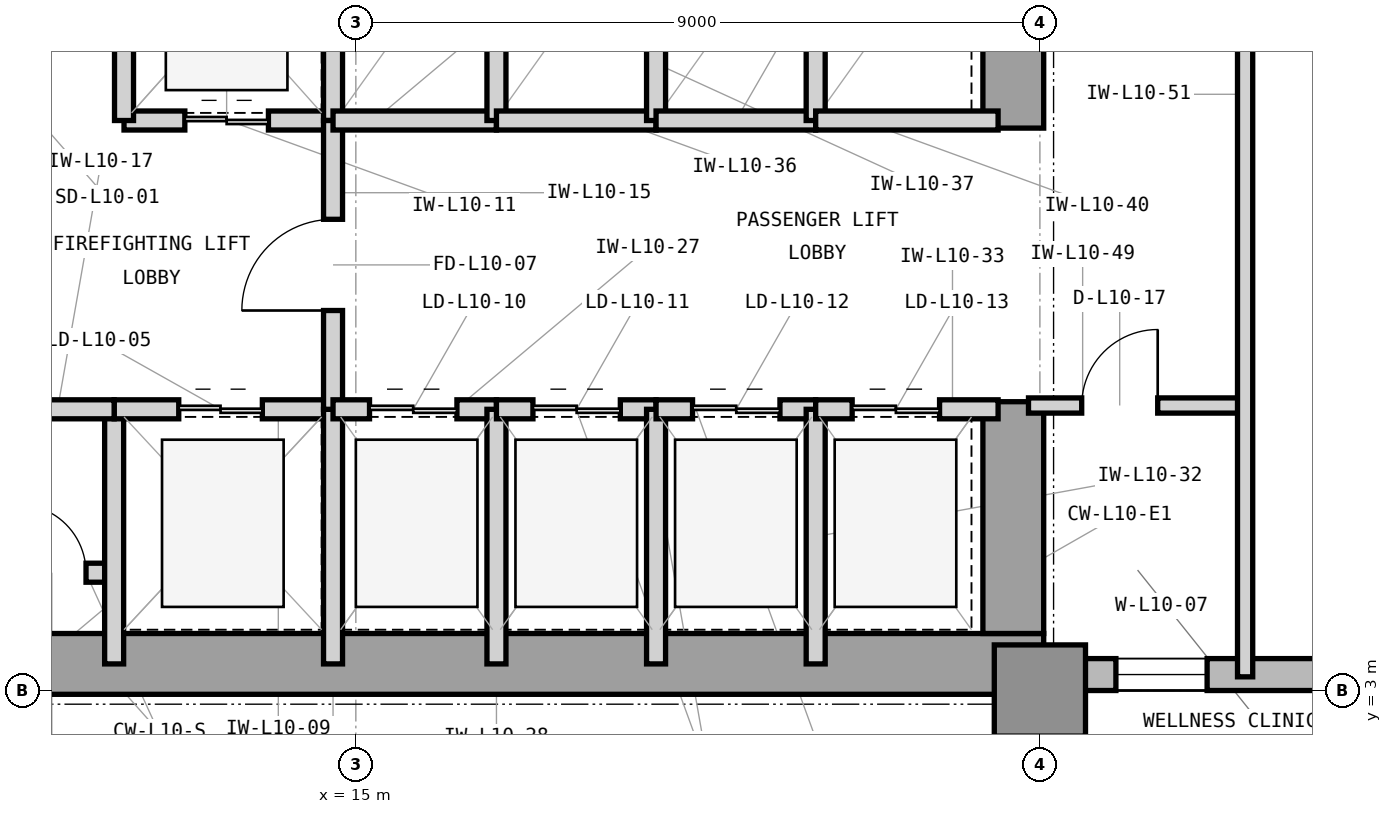
"""IFC4 building model, lengths in metres.
Left out: names, types, materials, properties, quantities, classifications, styles, units other than length and angle.
Written with IfcOpenShell. Run it as: python <this file> out.ifc"""

import sys

from ifc_helpers import new_model, si_unit, direction, frame, frame_2d, origin, origin_2d, place, context, subcontext, project, spatial, rectangle, extrude, element, fill, save


model = new_model("IFC4")
c1 = context("Model", 3, precision=1e-05, world=origin(), true_north=direction((0.0, 1.0)))
c2 = subcontext(c1, "Body", "Model", "MODEL_VIEW")
j1 = project(units=[si_unit("LENGTHUNIT", "METRE"), si_unit("PLANEANGLEUNIT", "RADIAN")], contexts=[c1])
p1 = place(None, origin())
s1 = spatial("IfcSite", under=j1, at=p1, CompositionType="ELEMENT")
p2 = place(p1, origin())
s2 = spatial("IfcBuilding", under=s1, at=p2, CompositionType="ELEMENT")
p3 = place(p2, frame((0.0, 0.0, 46.8)))
s3 = spatial("IfcBuildingStorey", under=s2, at=p3, CompositionType="ELEMENT", Elevation=46.8)
p4 = place(p3, frame((7.475, 3.35, 0.0), z_axis=(0.0, 0.0, 1.0), x_axis=(1.0, 0.0, 0.0)))
e1 = element("IfcWall", 1, at=p4, inside=s3, PredefinedType="SHEAR", context=c2, shape_type="SweptSolid", body=[
    extrude(rectangle(XDim=16.575, YDim=0.8, at=frame_2d((8.288, 0.0))), origin(), (0.0, 0.0, 1.0), 4.2),
])
p5 = place(p3, frame((23.65, 3.75, 0.0), z_axis=(0.0, 0.0, 1.0), x_axis=(0.0, 1.0, 0.0)))
e2 = element("IfcWall", 2, at=p5, inside=s3, PredefinedType="SHEAR", context=c2, shape_type="SweptSolid", body=[
    extrude(rectangle(XDim=3.05, YDim=0.8, at=frame_2d((1.525, 0.0))), origin(), (0.0, 0.0, 1.0), 4.2),
])
p6 = place(p3, frame((23.65, 10.4, 0.0), z_axis=(0.0, 0.0, 1.0), x_axis=(0.0, 1.0, 0.0)))
e3 = element("IfcWall", 3, at=p6, inside=s3, PredefinedType="SHEAR", context=c2, shape_type="SweptSolid", body=[
    extrude(rectangle(XDim=3.2, YDim=0.8, at=frame_2d((1.6, 0.0))), origin(), (0.0, 0.0, 1.0), 4.2),
])
p7 = place(p3, frame((24.0, 3.0, 0.0), z_axis=(0.0, 0.0, 1.0), x_axis=(1.0, 0.0, 0.0)))
e4 = element("IfcColumn", 4, at=p7, inside=s3, PredefinedType="COLUMN", context=c2, shape_type="SweptSolid", body=[
    extrude(rectangle(XDim=1.2, YDim=1.2, at=origin_2d()), origin(), (0.0, 0.0, 1.0), 4.2),
])
p8 = place(p3, frame((23.9, 3.21, 0.0), z_axis=(0.0, 0.0, 1.0), x_axis=(1.0, 0.0, 0.0)))
e5 = element("IfcWall", 5, at=p8, inside=s3, PredefinedType="STANDARD", context=c2, shape_type="SweptSolid", body=[
    extrude(rectangle(XDim=40.5, YDim=0.42, at=frame_2d((20.25, 0.0))), origin(), (0.0, 0.0, 1.0), 3.98),
])
p9 = place(p8, frame((1.1, 0.0, 0.85)))
e6 = element("IfcOpeningElement", 6, at=p9, cuts=e5, PredefinedType="OPENING", context=c2, shape_type="SweptSolid", body=[
    extrude(rectangle(XDim=1.2, YDim=2.45, at=frame_2d((0.6, 1.225))), frame((0.0, 0.22, 0.0), z_axis=(0.0, -1.0, 0.0), x_axis=(1.0, 0.0, 0.0)), (0.0, 0.0, 1.0), 0.44),
])
p10 = place(p8, frame((5.336, 0.0, 0.85)))
e7 = element("IfcOpeningElement", 7, at=p10, cuts=e5, PredefinedType="OPENING", context=c2, shape_type="SweptSolid", body=[
    extrude(rectangle(XDim=2.8, YDim=2.45, at=frame_2d((1.4, 1.225))), frame((0.0, 0.22, 0.0), z_axis=(0.0, -1.0, 0.0), x_axis=(1.0, 0.0, 0.0)), (0.0, 0.0, 1.0), 0.44),
])
p11 = place(p8, frame((14.336, 0.0, 0.85)))
e8 = element("IfcOpeningElement", 8, at=p11, cuts=e5, PredefinedType="OPENING", context=c2, shape_type="SweptSolid", body=[
    extrude(rectangle(XDim=2.8, YDim=2.45, at=frame_2d((1.4, 1.225))), frame((0.0, 0.22, 0.0), z_axis=(0.0, -1.0, 0.0), x_axis=(1.0, 0.0, 0.0)), (0.0, 0.0, 1.0), 0.44),
])
p12 = place(p8, frame((25.136, 0.0, 0.85)))
e9 = element("IfcOpeningElement", 9, at=p12, cuts=e5, PredefinedType="OPENING", context=c2, shape_type="SweptSolid", body=[
    extrude(rectangle(XDim=1.2, YDim=2.45, at=frame_2d((0.6, 1.225))), frame((0.0, 0.22, 0.0), z_axis=(0.0, -1.0, 0.0), x_axis=(1.0, 0.0, 0.0)), (0.0, 0.0, 1.0), 0.44),
])
p13 = place(p8, frame((34.086, 0.0, 0.85)))
e10 = element("IfcOpeningElement", 10, at=p13, cuts=e5, PredefinedType="OPENING", context=c2, shape_type="SweptSolid", body=[
    extrude(rectangle(XDim=1.2, YDim=2.45, at=frame_2d((0.6, 1.225))), frame((0.0, 0.22, 0.0), z_axis=(0.0, -1.0, 0.0), x_axis=(1.0, 0.0, 0.0)), (0.0, 0.0, 1.0), 0.44),
])
p14 = place(p3, frame((10.33, 4.55, 0.0), z_axis=(0.0, 0.0, 1.0), x_axis=(1.0, 0.0, 0.0)))
e11 = element("IfcWall", 11, at=p14, inside=s3, PredefinedType="PARTITIONING", context=c2, shape_type="SweptSolid", body=[
    extrude(rectangle(XDim=1.49, YDim=0.25, at=frame_2d((0.745, 0.0))), origin(), (0.0, 0.0, 1.0), 3.97),
])
p15 = place(p14, frame((0.22, 0.0, 0.0)))
e12 = element("IfcOpeningElement", 12, at=p15, cuts=e11, PredefinedType="OPENING", context=c2, shape_type="SweptSolid", body=[
    extrude(rectangle(XDim=0.9, YDim=2.1, at=frame_2d((0.45, 1.05))), frame((0.0, 0.135, 0.0), z_axis=(0.0, -1.0, 0.0), x_axis=(1.0, 0.0, 0.0)), (0.0, 0.0, 1.0), 0.27),
])
p16 = place(p3, frame((11.82, 3.35, 0.0), z_axis=(0.0, 0.0, 1.0), x_axis=(0.0, 1.0, 0.0)))
e13 = element("IfcWall", 13, at=p16, inside=s3, PredefinedType="PARTITIONING", context=c2, shape_type="SweptSolid", body=[
    extrude(rectangle(XDim=3.35, YDim=0.25, at=frame_2d((1.675, 0.0))), origin(), (0.0, 0.0, 1.0), 3.97),
])
p17 = place(p3, frame((11.82, 6.7, 0.0), z_axis=(0.0, 0.0, 1.0), x_axis=(1.0, 0.0, 0.0)))
e14 = element("IfcWall", 14, at=p17, inside=s3, PredefinedType="PARTITIONING", context=c2, shape_type="SweptSolid", body=[
    extrude(rectangle(XDim=2.88, YDim=0.25, at=frame_2d((1.44, 0.0))), origin(), (0.0, 0.0, 1.0), 3.426),
])
p18 = place(p17, frame((0.85, 0.0, 0.0)))
e15 = element("IfcOpeningElement", 15, at=p18, cuts=e14, PredefinedType="OPENING", context=c2, shape_type="SweptSolid", body=[
    extrude(rectangle(XDim=1.1, YDim=2.25, at=frame_2d((0.55, 1.125))), frame((0.0, 0.135, 0.0), z_axis=(0.0, -1.0, 0.0), x_axis=(1.0, 0.0, 0.0)), (0.0, 0.0, 1.0), 0.27),
])
p19 = place(p3, frame((14.7, 3.35, 0.0), z_axis=(0.0, 0.0, 1.0), x_axis=(0.0, 1.0, 0.0)))
e16 = element("IfcWall", 16, at=p19, inside=s3, PredefinedType="PARTITIONING", context=c2, shape_type="SweptSolid", body=[
    extrude(rectangle(XDim=3.35, YDim=0.25, at=frame_2d((1.675, 0.0))), origin(), (0.0, 0.0, 1.0), 3.97),
])
p20 = place(p3, frame((11.95, 10.5, 0.0), z_axis=(0.0, 0.0, 1.0), x_axis=(1.0, 0.0, 0.0)))
e17 = element("IfcWall", 17, at=p20, inside=s3, PredefinedType="PARTITIONING", context=c2, shape_type="SweptSolid", body=[
    extrude(rectangle(XDim=2.75, YDim=0.25, at=frame_2d((1.375, 0.0))), origin(), (0.0, 0.0, 1.0), 3.426),
])
p21 = place(p20, frame((0.8, 0.0, 0.0)))
e18 = element("IfcOpeningElement", 18, at=p21, cuts=e17, PredefinedType="OPENING", context=c2, shape_type="SweptSolid", body=[
    extrude(rectangle(XDim=1.1, YDim=2.25, at=frame_2d((0.55, 1.125))), frame((0.0, 0.135, 0.0), z_axis=(0.0, -1.0, 0.0), x_axis=(1.0, 0.0, 0.0)), (0.0, 0.0, 1.0), 0.27),
])
for number, where, z_axis, x_axis in (
    (19, (11.95, 10.5, 0.0), (0.0, 0.0, 1.0), (0.0, 1.0, 0.0)),
    (20, (14.7, 10.5, 0.0), (0.0, 0.0, 1.0), (0.0, 1.0, 0.0)),
):
    element("IfcWall", number, at=place(p3, frame(where, z_axis=z_axis, x_axis=x_axis)), inside=s3, PredefinedType="PARTITIONING", context=c2, shape_type="SweptSolid", body=[
        extrude(rectangle(XDim=3.0, YDim=0.25, at=frame_2d((1.5, 0.0))), origin(), (0.0, 0.0, 1.0), 3.97),
    ])
p22 = place(p3, frame((14.7, 6.7, 0.0), z_axis=(0.0, 0.0, 1.0), x_axis=(0.0, 1.0, 0.0)))
e21 = element("IfcWall", 21, at=p22, inside=s3, PredefinedType="PARTITIONING", context=c2, shape_type="SweptSolid", body=[
    extrude(rectangle(XDim=3.8, YDim=0.25, at=frame_2d((1.9, 0.0))), origin(), (0.0, 0.0, 1.0), 3.97),
])
p23 = place(p22, frame((1.3, 0.0, 0.0)))
e22 = element("IfcOpeningElement", 22, at=p23, cuts=e21, PredefinedType="OPENING", context=c2, shape_type="SweptSolid", body=[
    extrude(rectangle(XDim=1.2, YDim=2.2, at=frame_2d((0.6, 1.1))), frame((0.0, 0.135, 0.0), z_axis=(0.0, -1.0, 0.0), x_axis=(1.0, 0.0, 0.0)), (0.0, 0.0, 1.0), 0.27),
])
p24 = place(p3, frame((10.33, 6.7, 0.0), z_axis=(0.0, 0.0, 1.0), x_axis=(1.0, 0.0, 0.0)))
e23 = element("IfcWall", 23, at=p24, inside=s3, PredefinedType="PARTITIONING", context=c2, shape_type="SweptSolid", body=[
    extrude(rectangle(XDim=1.49, YDim=0.25, at=frame_2d((0.745, 0.0))), origin(), (0.0, 0.0, 1.0), 3.426),
])
p25 = place(p3, frame((14.7, 6.7, 0.0), z_axis=(0.0, 0.0, 1.0), x_axis=(1.0, 0.0, 0.0)))
e24 = element("IfcWall", 24, at=p25, inside=s3, PredefinedType="PARTITIONING", context=c2, shape_type="SweptSolid", body=[
    extrude(rectangle(XDim=2.15, YDim=0.25, at=frame_2d((1.075, 0.0))), origin(), (0.0, 0.0, 1.0), 3.426),
])
p26 = place(p25, frame((0.48, 0.0, 0.0)))
e25 = element("IfcOpeningElement", 25, at=p26, cuts=e24, PredefinedType="OPENING", context=c2, shape_type="SweptSolid", body=[
    extrude(rectangle(XDim=1.15, YDim=2.25, at=frame_2d((0.575, 1.125))), frame((0.0, 0.135, 0.0), z_axis=(0.0, -1.0, 0.0), x_axis=(1.0, 0.0, 0.0)), (0.0, 0.0, 1.0), 0.27),
])
p27 = place(p3, frame((16.85, 3.35, 0.0), z_axis=(0.0, 0.0, 1.0), x_axis=(0.0, 1.0, 0.0)))
e26 = element("IfcWall", 26, at=p27, inside=s3, PredefinedType="PARTITIONING", context=c2, shape_type="SweptSolid", body=[
    extrude(rectangle(XDim=3.35, YDim=0.25, at=frame_2d((1.675, 0.0))), origin(), (0.0, 0.0, 1.0), 3.97),
])
p28 = place(p3, frame((16.85, 6.7, 0.0), z_axis=(0.0, 0.0, 1.0), x_axis=(1.0, 0.0, 0.0)))
e27 = element("IfcWall", 27, at=p28, inside=s3, PredefinedType="PARTITIONING", context=c2, shape_type="SweptSolid", body=[
    extrude(rectangle(XDim=2.1, YDim=0.25, at=frame_2d((1.05, 0.0))), origin(), (0.0, 0.0, 1.0), 3.426),
])
p29 = place(p28, frame((0.48, 0.0, 0.0)))
e28 = element("IfcOpeningElement", 28, at=p29, cuts=e27, PredefinedType="OPENING", context=c2, shape_type="SweptSolid", body=[
    extrude(rectangle(XDim=1.15, YDim=2.25, at=frame_2d((0.575, 1.125))), frame((0.0, 0.135, 0.0), z_axis=(0.0, -1.0, 0.0), x_axis=(1.0, 0.0, 0.0)), (0.0, 0.0, 1.0), 0.27),
])
p30 = place(p3, frame((18.95, 3.35, 0.0), z_axis=(0.0, 0.0, 1.0), x_axis=(0.0, 1.0, 0.0)))
e29 = element("IfcWall", 29, at=p30, inside=s3, PredefinedType="PARTITIONING", context=c2, shape_type="SweptSolid", body=[
    extrude(rectangle(XDim=3.35, YDim=0.25, at=frame_2d((1.675, 0.0))), origin(), (0.0, 0.0, 1.0), 3.97),
])
p31 = place(p3, frame((18.95, 6.7, 0.0), z_axis=(0.0, 0.0, 1.0), x_axis=(1.0, 0.0, 0.0)))
e30 = element("IfcWall", 30, at=p31, inside=s3, PredefinedType="PARTITIONING", context=c2, shape_type="SweptSolid", body=[
    extrude(rectangle(XDim=2.1, YDim=0.25, at=frame_2d((1.05, 0.0))), origin(), (0.0, 0.0, 1.0), 3.426),
])
p32 = place(p31, frame((0.48, 0.0, 0.0)))
e31 = element("IfcOpeningElement", 31, at=p32, cuts=e30, PredefinedType="OPENING", context=c2, shape_type="SweptSolid", body=[
    extrude(rectangle(XDim=1.15, YDim=2.25, at=frame_2d((0.575, 1.125))), frame((0.0, 0.135, 0.0), z_axis=(0.0, -1.0, 0.0), x_axis=(1.0, 0.0, 0.0)), (0.0, 0.0, 1.0), 0.27),
])
p33 = place(p3, frame((21.05, 3.35, 0.0), z_axis=(0.0, 0.0, 1.0), x_axis=(0.0, 1.0, 0.0)))
e32 = element("IfcWall", 32, at=p33, inside=s3, PredefinedType="PARTITIONING", context=c2, shape_type="SweptSolid", body=[
    extrude(rectangle(XDim=3.35, YDim=0.25, at=frame_2d((1.675, 0.0))), origin(), (0.0, 0.0, 1.0), 3.97),
])
p34 = place(p3, frame((21.05, 6.7, 0.0), z_axis=(0.0, 0.0, 1.0), x_axis=(1.0, 0.0, 0.0)))
e33 = element("IfcWall", 33, at=p34, inside=s3, PredefinedType="PARTITIONING", context=c2, shape_type="SweptSolid", body=[
    extrude(rectangle(XDim=2.4, YDim=0.25, at=frame_2d((1.2, 0.0))), origin(), (0.0, 0.0, 1.0), 3.426),
])
p35 = place(p34, frame((0.48, 0.0, 0.0)))
e34 = element("IfcOpeningElement", 34, at=p35, cuts=e33, PredefinedType="OPENING", context=c2, shape_type="SweptSolid", body=[
    extrude(rectangle(XDim=1.15, YDim=2.25, at=frame_2d((0.575, 1.125))), frame((0.0, 0.135, 0.0), z_axis=(0.0, -1.0, 0.0), x_axis=(1.0, 0.0, 0.0)), (0.0, 0.0, 1.0), 0.27),
])
p36 = place(p3, frame((14.7, 10.5, 0.0), z_axis=(0.0, 0.0, 1.0), x_axis=(1.0, 0.0, 0.0)))
e35 = element("IfcWall", 35, at=p36, inside=s3, PredefinedType="PARTITIONING", context=c2, shape_type="SweptSolid", body=[
    extrude(rectangle(XDim=2.15, YDim=0.25, at=frame_2d((1.075, 0.0))), origin(), (0.0, 0.0, 1.0), 3.426),
])
p37 = place(p3, frame((16.85, 10.5, 0.0), z_axis=(0.0, 0.0, 1.0), x_axis=(0.0, 1.0, 0.0)))
e36 = element("IfcWall", 36, at=p37, inside=s3, PredefinedType="PARTITIONING", context=c2, shape_type="SweptSolid", body=[
    extrude(rectangle(XDim=3.0, YDim=0.25, at=frame_2d((1.5, 0.0))), origin(), (0.0, 0.0, 1.0), 3.97),
])
p38 = place(p3, frame((16.85, 10.5, 0.0), z_axis=(0.0, 0.0, 1.0), x_axis=(1.0, 0.0, 0.0)))
e37 = element("IfcWall", 37, at=p38, inside=s3, PredefinedType="PARTITIONING", context=c2, shape_type="SweptSolid", body=[
    extrude(rectangle(XDim=2.1, YDim=0.25, at=frame_2d((1.05, 0.0))), origin(), (0.0, 0.0, 1.0), 3.426),
])
p39 = place(p3, frame((18.95, 10.5, 0.0), z_axis=(0.0, 0.0, 1.0), x_axis=(0.0, 1.0, 0.0)))
e38 = element("IfcWall", 38, at=p39, inside=s3, PredefinedType="PARTITIONING", context=c2, shape_type="SweptSolid", body=[
    extrude(rectangle(XDim=3.0, YDim=0.25, at=frame_2d((1.5, 0.0))), origin(), (0.0, 0.0, 1.0), 3.97),
])
p40 = place(p3, frame((18.95, 10.5, 0.0), z_axis=(0.0, 0.0, 1.0), x_axis=(1.0, 0.0, 0.0)))
e39 = element("IfcWall", 39, at=p40, inside=s3, PredefinedType="PARTITIONING", context=c2, shape_type="SweptSolid", body=[
    extrude(rectangle(XDim=2.1, YDim=0.25, at=frame_2d((1.05, 0.0))), origin(), (0.0, 0.0, 1.0), 3.426),
])
p41 = place(p3, frame((21.05, 10.5, 0.0), z_axis=(0.0, 0.0, 1.0), x_axis=(0.0, 1.0, 0.0)))
e40 = element("IfcWall", 40, at=p41, inside=s3, PredefinedType="PARTITIONING", context=c2, shape_type="SweptSolid", body=[
    extrude(rectangle(XDim=3.0, YDim=0.25, at=frame_2d((1.5, 0.0))), origin(), (0.0, 0.0, 1.0), 3.97),
])
p42 = place(p3, frame((21.05, 10.5, 0.0), z_axis=(0.0, 0.0, 1.0), x_axis=(1.0, 0.0, 0.0)))
e41 = element("IfcWall", 41, at=p42, inside=s3, PredefinedType="PARTITIONING", context=c2, shape_type="SweptSolid", body=[
    extrude(rectangle(XDim=2.4, YDim=0.25, at=frame_2d((1.2, 0.0))), origin(), (0.0, 0.0, 1.0), 3.426),
])
p43 = place(p3, frame((23.85, 6.75, 0.0), z_axis=(0.0, 0.0, 1.0), x_axis=(1.0, 0.0, 0.0)))
e42 = element("IfcWall", 42, at=p43, inside=s3, PredefinedType="PARTITIONING", context=c2, shape_type="SweptSolid", body=[
    extrude(rectangle(XDim=2.85, YDim=0.2, at=frame_2d((1.425, 0.0))), origin(), (0.0, 0.0, 1.0), 3.97),
])
p44 = place(p43, frame((0.7, 0.0, 0.0)))
e43 = element("IfcOpeningElement", 43, at=p44, cuts=e42, PredefinedType="OPENING", context=c2, shape_type="SweptSolid", body=[
    extrude(rectangle(XDim=1.0, YDim=2.15, at=frame_2d((0.5, 1.075))), frame((0.0, 0.11, 0.0), z_axis=(0.0, -1.0, 0.0), x_axis=(1.0, 0.0, 0.0)), (0.0, 0.0, 1.0), 0.22),
])
p45 = place(p3, frame((26.7, 3.18, 0.0), z_axis=(0.0, 0.0, 1.0), x_axis=(0.0, 1.0, 0.0)))
e44 = element("IfcWall", 44, at=p45, inside=s3, PredefinedType="PARTITIONING", context=c2, shape_type="SweptSolid", body=[
    extrude(rectangle(XDim=10.22, YDim=0.2, at=frame_2d((5.11, 0.0))), origin(), (0.0, 0.0, 1.0), 3.97),
])
p46 = place(p15, origin())
e45 = element("IfcDoor", 45, at=p46, inside=s3, OperationType="SINGLE_SWING_LEFT", PredefinedType="TRAPDOOR", context=c2, shape_type="SweptSolid", body=[
    extrude(rectangle(XDim=0.9, YDim=2.1, at=frame_2d((0.45, 1.05))), frame((0.0, 0.025, 0.0), z_axis=(0.0, -1.0, 0.0), x_axis=(1.0, 0.0, 0.0)), (0.0, 0.0, 1.0), 0.05),
])
fill(e12, e45)
p47 = place(p18, origin())
e46 = element("IfcDoor", 46, at=p47, inside=s3, OperationType="DOUBLE_DOOR_SLIDING", PredefinedType="DOOR", context=c2, shape_type="SweptSolid", body=[
    extrude(rectangle(XDim=1.1, YDim=2.25, at=frame_2d((0.55, 1.125))), frame((0.0, 0.025, 0.0), z_axis=(0.0, -1.0, 0.0), x_axis=(1.0, 0.0, 0.0)), (0.0, 0.0, 1.0), 0.05),
])
fill(e15, e46)
p48 = place(p21, origin())
e47 = element("IfcDoor", 47, at=p48, inside=s3, OperationType="DOUBLE_DOOR_SLIDING", PredefinedType="DOOR", context=c2, shape_type="SweptSolid", body=[
    extrude(rectangle(XDim=1.1, YDim=2.25, at=frame_2d((0.55, 1.125))), frame((0.0, 0.025, 0.0), z_axis=(0.0, -1.0, 0.0), x_axis=(1.0, 0.0, 0.0)), (0.0, 0.0, 1.0), 0.05),
])
fill(e18, e47)
p49 = place(p23, origin())
e48 = element("IfcDoor", 48, at=p49, inside=s3, OperationType="SINGLE_SWING_LEFT", PredefinedType="DOOR", context=c2, shape_type="SweptSolid", body=[
    extrude(rectangle(XDim=1.2, YDim=2.2, at=frame_2d((0.6, 1.1))), frame((0.0, 0.025, 0.0), z_axis=(0.0, -1.0, 0.0), x_axis=(1.0, 0.0, 0.0)), (0.0, 0.0, 1.0), 0.05),
])
fill(e22, e48)
p50 = place(p26, origin())
e49 = element("IfcDoor", 49, at=p50, inside=s3, OperationType="DOUBLE_DOOR_SLIDING", PredefinedType="DOOR", context=c2, shape_type="SweptSolid", body=[
    extrude(rectangle(XDim=1.15, YDim=2.25, at=frame_2d((0.575, 1.125))), frame((0.0, 0.025, 0.0), z_axis=(0.0, -1.0, 0.0), x_axis=(1.0, 0.0, 0.0)), (0.0, 0.0, 1.0), 0.05),
])
fill(e25, e49)
p51 = place(p29, origin())
e50 = element("IfcDoor", 50, at=p51, inside=s3, OperationType="DOUBLE_DOOR_SLIDING", PredefinedType="DOOR", context=c2, shape_type="SweptSolid", body=[
    extrude(rectangle(XDim=1.15, YDim=2.25, at=frame_2d((0.575, 1.125))), frame((0.0, 0.025, 0.0), z_axis=(0.0, -1.0, 0.0), x_axis=(1.0, 0.0, 0.0)), (0.0, 0.0, 1.0), 0.05),
])
fill(e28, e50)
p52 = place(p32, origin())
e51 = element("IfcDoor", 51, at=p52, inside=s3, OperationType="DOUBLE_DOOR_SLIDING", PredefinedType="DOOR", context=c2, shape_type="SweptSolid", body=[
    extrude(rectangle(XDim=1.15, YDim=2.25, at=frame_2d((0.575, 1.125))), frame((0.0, 0.025, 0.0), z_axis=(0.0, -1.0, 0.0), x_axis=(1.0, 0.0, 0.0)), (0.0, 0.0, 1.0), 0.05),
])
fill(e31, e51)
p53 = place(p35, origin())
e52 = element("IfcDoor", 52, at=p53, inside=s3, OperationType="DOUBLE_DOOR_SLIDING", PredefinedType="DOOR", context=c2, shape_type="SweptSolid", body=[
    extrude(rectangle(XDim=1.15, YDim=2.25, at=frame_2d((0.575, 1.125))), frame((0.0, 0.025, 0.0), z_axis=(0.0, -1.0, 0.0), x_axis=(1.0, 0.0, 0.0)), (0.0, 0.0, 1.0), 0.05),
])
fill(e34, e52)
p54 = place(p44, origin())
e53 = element("IfcDoor", 53, at=p54, inside=s3, OperationType="SINGLE_SWING_RIGHT", PredefinedType="DOOR", context=c2, shape_type="SweptSolid", body=[
    extrude(rectangle(XDim=1.0, YDim=2.15, at=frame_2d((0.5, 1.075))), frame((0.0, 0.025, 0.0), z_axis=(0.0, -1.0, 0.0), x_axis=(1.0, 0.0, 0.0)), (0.0, 0.0, 1.0), 0.05),
])
fill(e43, e53)
p55 = place(p9, origin())
e54 = element("IfcWindow", 54, at=p55, inside=s3, PartitioningType="SINGLE_PANEL", PredefinedType="WINDOW", context=c2, shape_type="SweptSolid", body=[
    extrude(rectangle(XDim=1.2, YDim=2.45, at=frame_2d((0.6, 1.225))), frame((0.0, 0.11, 0.0), z_axis=(0.0, -1.0, 0.0), x_axis=(1.0, 0.0, 0.0)), (0.0, 0.0, 1.0), 0.06),
])
fill(e6, e54)
save(model, sys.argv[1])
